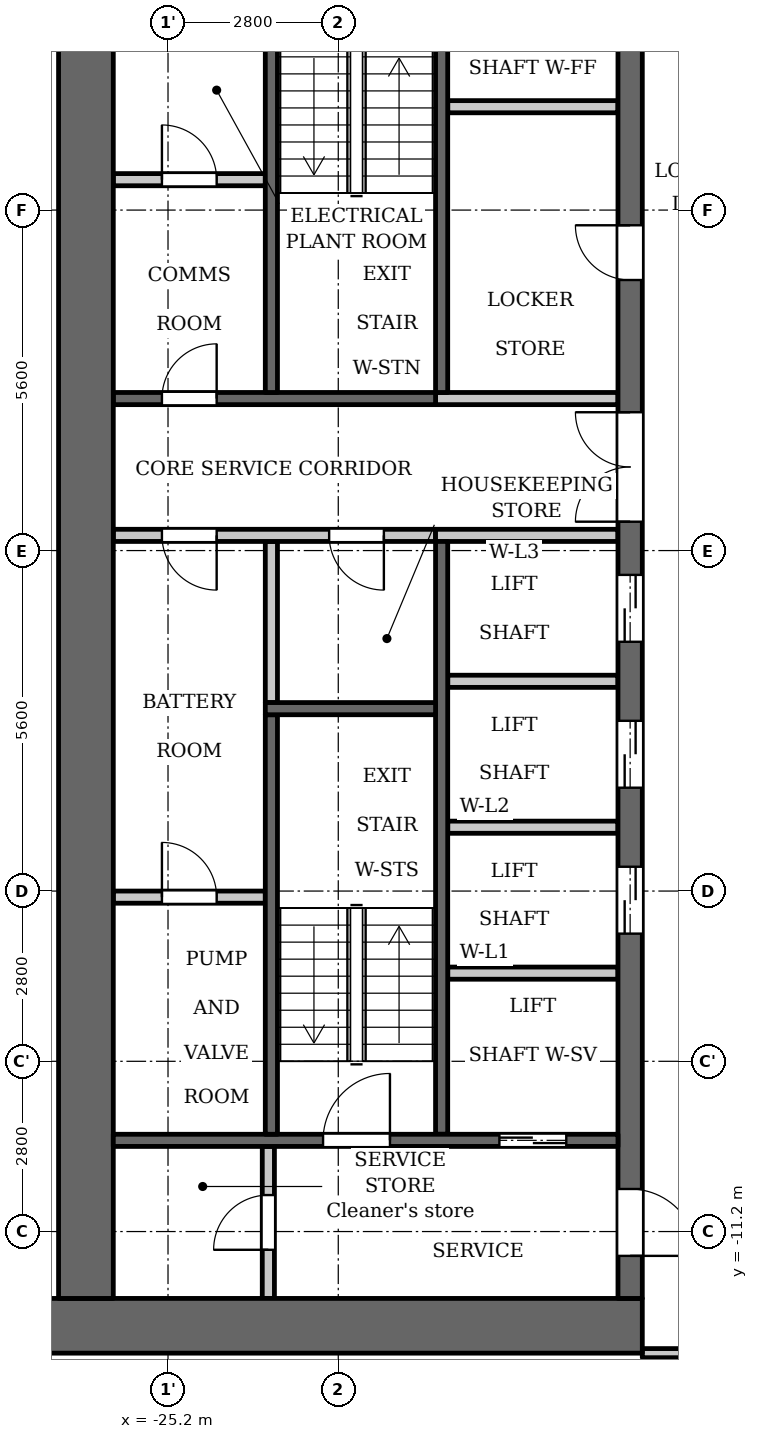
"""IFC4 building model, lengths in metres.
Left out: names, types, materials, properties, quantities, classifications, styles, units other than length and angle.
Written with IfcOpenShell. Run it as: python <this file> out.ifc"""

import sys

from ifc_helpers import new_model, si_unit, direction, frame, frame_2d, origin, place, context, subcontext, project, spatial, rectangle, extrude, element, fill, save


model = new_model("IFC4")
c1 = context("Model", 3, precision=1e-05, world=origin(), true_north=direction((0.0, 1.0)))
c2 = subcontext(c1, "Body", "Model", "MODEL_VIEW")
j1 = project(units=[si_unit("LENGTHUNIT", "METRE"), si_unit("PLANEANGLEUNIT", "RADIAN")], contexts=[c1])
p1 = place(None, origin())
s1 = spatial("IfcSite", under=j1, at=p1, CompositionType="ELEMENT")
p2 = place(p1, origin())
s2 = spatial("IfcBuilding", under=s1, at=p2, CompositionType="ELEMENT")
p3 = place(p2, frame((0.0, 0.0, 58.5)))
s3 = spatial("IfcBuildingStorey", under=s2, at=p3, CompositionType="ELEMENT", Elevation=58.5)
p4 = place(p3, frame((-23.5, -2.5, 0.0), z_axis=(0.0, 0.0, 1.0), x_axis=(0.0, 1.0, 0.0)))
e1 = element("IfcWall", 1, at=p4, inside=s3, PredefinedType="PARTITIONING", context=c2, shape_type="SweptSolid", body=[
    extrude(rectangle(XDim=2.65, YDim=0.2, at=frame_2d((1.325, 0.0))), origin(), (0.0, 0.0, 1.0), 3.2),
])
p5 = place(p3, frame((-20.7, 2.6, 0.0), z_axis=(0.0, 0.0, 1.0), x_axis=(0.0, 1.0, 0.0)))
e2 = element("IfcWall", 2, at=p5, inside=s3, PredefinedType="SHEAR", context=c2, shape_type="SweptSolid", body=[
    extrude(rectangle(XDim=7.0, YDim=0.2, at=frame_2d((3.5, 0.0))), origin(), (0.0, 0.0, 1.0), 3.2),
])
p6 = place(p3, frame((-20.7, -9.6, 0.0), z_axis=(0.0, 0.0, 1.0), x_axis=(0.0, 1.0, 0.0)))
e3 = element("IfcWall", 3, at=p6, inside=s3, PredefinedType="SHEAR", context=c2, shape_type="SweptSolid", body=[
    extrude(rectangle(XDim=9.75, YDim=0.2, at=frame_2d((4.875, 0.0))), origin(), (0.0, 0.0, 1.0), 3.2),
])
p7 = place(p3, frame((-20.8, 2.5, 0.0), z_axis=(0.0, 0.0, 1.0), x_axis=(-1.0, 0.0, 0.0)))
e4 = element("IfcWall", 4, at=p7, inside=s3, PredefinedType="SHEAR", context=c2, shape_type="SweptSolid", body=[
    extrude(rectangle(XDim=5.3, YDim=0.2, at=frame_2d((2.65, 0.0))), origin(), (0.0, 0.0, 1.0), 3.2),
])
p8 = place(p7, frame((3.6, 0.0, 0.0)))
e5 = element("IfcOpeningElement", 5, at=p8, cuts=e4, PredefinedType="OPENING", context=c2, shape_type="SweptSolid", body=[
    extrude(rectangle(XDim=0.9, YDim=2.1, at=frame_2d((0.45, 1.05))), frame((0.0, 0.11, 0.0), z_axis=(0.0, -1.0, 0.0), x_axis=(1.0, 0.0, 0.0)), (0.0, 0.0, 1.0), 0.22),
])
p9 = place(p3, frame((-20.8, 0.25, 0.0), z_axis=(0.0, 0.0, 1.0), x_axis=(-1.0, 0.0, 0.0)))
e6 = element("IfcWall", 6, at=p9, inside=s3, PredefinedType="PARTITIONING", context=c2, shape_type="SweptSolid", body=[
    extrude(rectangle(XDim=5.3, YDim=0.2, at=frame_2d((2.65, 0.0))), origin(), (0.0, 0.0, 1.0), 3.2),
])
p10 = place(p9, frame((0.85, 0.0, 0.0)))
e7 = element("IfcOpeningElement", 7, at=p10, cuts=e6, PredefinedType="OPENING", context=c2, shape_type="SweptSolid", body=[
    extrude(rectangle(XDim=0.9, YDim=2.1, at=frame_2d((0.45, 1.05))), frame((0.0, 0.11, 0.0), z_axis=(0.0, -1.0, 0.0), x_axis=(1.0, 0.0, 0.0)), (0.0, 0.0, 1.0), 0.22),
])
p11 = place(p9, frame((3.6, 0.0, 0.0)))
e8 = element("IfcOpeningElement", 8, at=p11, cuts=e6, PredefinedType="OPENING", context=c2, shape_type="SweptSolid", body=[
    extrude(rectangle(XDim=0.9, YDim=2.1, at=frame_2d((0.45, 1.05))), frame((0.0, 0.11, 0.0), z_axis=(0.0, -1.0, 0.0), x_axis=(1.0, 0.0, 0.0)), (0.0, 0.0, 1.0), 0.22),
])
p12 = place(p3, frame((-17.4, -12.75, 0.0), z_axis=(0.0, 0.0, 1.0), x_axis=(-1.0, 0.0, 0.0)))
e9 = element("IfcWall", 9, at=p12, inside=s3, PredefinedType="SHEAR", context=c2, shape_type="SweptSolid", body=[
    extrude(rectangle(XDim=10.4, YDim=0.9, at=frame_2d((5.2, 0.0))), origin(), (0.0, 0.0, 1.0), 3.2),
])
p13 = place(p3, frame((-17.6, -12.3, 0.0), z_axis=(0.0, 0.0, 1.0), x_axis=(0.0, 1.0, 0.0)))
e10 = element("IfcWall", 10, at=p13, inside=s3, PredefinedType="SHEAR", context=c2, shape_type="SweptSolid", body=[
    extrude(rectangle(XDim=24.6, YDim=0.4, at=frame_2d((12.3, 0.0))), origin(), (0.0, 0.0, 1.0), 3.2),
])
p14 = place(p13, frame((6.0, 0.0, 0.0)))
e11 = element("IfcOpeningElement", 11, at=p14, cuts=e10, PredefinedType="OPENING", context=c2, shape_type="SweptSolid", body=[
    extrude(rectangle(XDim=1.1, YDim=2.1, at=frame_2d((0.55, 1.05))), frame((0.0, 0.21, 0.0), z_axis=(0.0, -1.0, 0.0), x_axis=(1.0, 0.0, 0.0)), (0.0, 0.0, 1.0), 0.42),
])
p15 = place(p13, frame((8.4, 0.0, 0.0)))
e12 = element("IfcOpeningElement", 12, at=p15, cuts=e10, PredefinedType="OPENING", context=c2, shape_type="SweptSolid", body=[
    extrude(rectangle(XDim=1.1, YDim=2.1, at=frame_2d((0.55, 1.05))), frame((0.0, 0.21, 0.0), z_axis=(0.0, -1.0, 0.0), x_axis=(1.0, 0.0, 0.0)), (0.0, 0.0, 1.0), 0.42),
])
p16 = place(p13, frame((10.8, 0.0, 0.0)))
e13 = element("IfcOpeningElement", 13, at=p16, cuts=e10, PredefinedType="OPENING", context=c2, shape_type="SweptSolid", body=[
    extrude(rectangle(XDim=1.1, YDim=2.1, at=frame_2d((0.55, 1.05))), frame((0.0, 0.21, 0.0), z_axis=(0.0, -1.0, 0.0), x_axis=(1.0, 0.0, 0.0)), (0.0, 0.0, 1.0), 0.42),
])
p17 = place(p13, frame((16.75, 0.0, 0.0)))
e14 = element("IfcOpeningElement", 14, at=p17, cuts=e10, PredefinedType="OPENING", context=c2, shape_type="SweptSolid", body=[
    extrude(rectangle(XDim=0.9, YDim=2.1, at=frame_2d((0.45, 1.05))), frame((0.0, 0.21, 0.0), z_axis=(0.0, -1.0, 0.0), x_axis=(1.0, 0.0, 0.0)), (0.0, 0.0, 1.0), 0.42),
])
p18 = place(p13, frame((22.8, 0.0, 0.0)))
e15 = element("IfcOpeningElement", 15, at=p18, cuts=e10, PredefinedType="OPENING", context=c2, shape_type="SweptSolid", body=[
    extrude(rectangle(XDim=1.1, YDim=2.1, at=frame_2d((0.55, 1.05))), frame((0.0, 0.21, 0.0), z_axis=(0.0, -1.0, 0.0), x_axis=(1.0, 0.0, 0.0)), (0.0, 0.0, 1.0), 0.42),
])
p19 = place(p13, frame((0.7, 0.0, 0.0)))
e16 = element("IfcOpeningElement", 16, at=p19, cuts=e10, PredefinedType="OPENING", context=c2, shape_type="SweptSolid", body=[
    extrude(rectangle(XDim=1.1, YDim=2.1, at=frame_2d((0.55, 1.05))), frame((0.0, 0.21, 0.0), z_axis=(0.0, -1.0, 0.0), x_axis=(1.0, 0.0, 0.0)), (0.0, 0.0, 1.0), 0.42),
])
p20 = place(p13, frame((12.775, 0.0, 0.0)))
e17 = element("IfcOpeningElement", 17, at=p20, cuts=e10, PredefinedType="OPENING", context=c2, shape_type="SweptSolid", body=[
    extrude(rectangle(XDim=1.8, YDim=2.1, at=frame_2d((0.9, 1.05))), frame((0.0, 0.21, 0.0), z_axis=(0.0, -1.0, 0.0), x_axis=(1.0, 0.0, 0.0)), (0.0, 0.0, 1.0), 0.42),
])
p21 = place(p3, frame((-26.55, -12.3, 0.0), z_axis=(0.0, 0.0, 1.0), x_axis=(0.0, 1.0, 0.0)))
e18 = element("IfcWall", 18, at=p21, inside=s3, PredefinedType="SHEAR", context=c2, shape_type="SweptSolid", body=[
    extrude(rectangle(XDim=24.6, YDim=0.9, at=frame_2d((12.3, 0.0))), origin(), (0.0, 0.0, 1.0), 3.2),
])
p22 = place(p3, frame((-23.55, -12.3, 0.0), z_axis=(0.0, 0.0, 1.0), x_axis=(0.0, 1.0, 0.0)))
e19 = element("IfcWall", 19, at=p22, inside=s3, PredefinedType="PARTITIONING", context=c2, shape_type="SweptSolid", body=[
    extrude(rectangle(XDim=2.5, YDim=0.2, at=frame_2d((1.25, 0.0))), origin(), (0.0, 0.0, 1.0), 3.2),
])
p23 = place(p22, frame((0.8, 0.0, 0.0)))
e20 = element("IfcOpeningElement", 20, at=p23, cuts=e19, PredefinedType="OPENING", context=c2, shape_type="SweptSolid", body=[
    extrude(rectangle(XDim=0.9, YDim=2.1, at=frame_2d((0.45, 1.05))), frame((0.0, 0.11, 0.0), z_axis=(0.0, -1.0, 0.0), x_axis=(1.0, 0.0, 0.0)), (0.0, 0.0, 1.0), 0.22),
])
p24 = place(p3, frame((-23.6, -5.7, 0.0), z_axis=(0.0, 0.0, 1.0), x_axis=(-1.0, 0.0, 0.0)))
e21 = element("IfcWall", 21, at=p24, inside=s3, PredefinedType="PARTITIONING", context=c2, shape_type="SweptSolid", body=[
    extrude(rectangle(XDim=2.5, YDim=0.2, at=frame_2d((1.25, 0.0))), origin(), (0.0, 0.0, 1.0), 3.2),
])
p25 = place(p24, frame((0.8, 0.0, 0.0)))
e22 = element("IfcOpeningElement", 22, at=p25, cuts=e21, PredefinedType="OPENING", context=c2, shape_type="SweptSolid", body=[
    extrude(rectangle(XDim=0.9, YDim=2.1, at=frame_2d((0.45, 1.05))), frame((0.0, 0.11, 0.0), z_axis=(0.0, -1.0, 0.0), x_axis=(1.0, 0.0, 0.0)), (0.0, 0.0, 1.0), 0.22),
])
p26 = place(p3, frame((-23.6, 6.1, 0.0), z_axis=(0.0, 0.0, 1.0), x_axis=(-1.0, 0.0, 0.0)))
e23 = element("IfcWall", 23, at=p26, inside=s3, PredefinedType="PARTITIONING", context=c2, shape_type="SweptSolid", body=[
    extrude(rectangle(XDim=2.5, YDim=0.2, at=frame_2d((1.25, 0.0))), origin(), (0.0, 0.0, 1.0), 3.2),
])
p27 = place(p26, frame((0.8, 0.0, 0.0)))
e24 = element("IfcOpeningElement", 24, at=p27, cuts=e23, PredefinedType="OPENING", context=c2, shape_type="SweptSolid", body=[
    extrude(rectangle(XDim=0.9, YDim=2.1, at=frame_2d((0.45, 1.05))), frame((0.0, 0.11, 0.0), z_axis=(0.0, -1.0, 0.0), x_axis=(1.0, 0.0, 0.0)), (0.0, 0.0, 1.0), 0.22),
])
p28 = place(p3, frame((-17.8, -9.7, 0.0), z_axis=(0.0, 0.0, 1.0), x_axis=(-1.0, 0.0, 0.0)))
e25 = element("IfcWall", 25, at=p28, inside=s3, PredefinedType="SHEAR", context=c2, shape_type="SweptSolid", body=[
    extrude(rectangle(XDim=8.3, YDim=0.2, at=frame_2d((4.15, 0.0))), origin(), (0.0, 0.0, 1.0), 3.2),
])
p29 = place(p28, frame((0.85, 0.0, 0.0)))
e26 = element("IfcOpeningElement", 26, at=p29, cuts=e25, PredefinedType="OPENING", context=c2, shape_type="SweptSolid", body=[
    extrude(rectangle(XDim=1.1, YDim=2.1, at=frame_2d((0.55, 1.05))), frame((0.0, 0.11, 0.0), z_axis=(0.0, -1.0, 0.0), x_axis=(1.0, 0.0, 0.0)), (0.0, 0.0, 1.0), 0.22),
])
p30 = place(p28, frame((3.75, 0.0, 0.0)))
e27 = element("IfcOpeningElement", 27, at=p30, cuts=e25, PredefinedType="OPENING", context=c2, shape_type="SweptSolid", body=[
    extrude(rectangle(XDim=1.1, YDim=2.1, at=frame_2d((0.55, 1.05))), frame((0.0, 0.11, 0.0), z_axis=(0.0, -1.0, 0.0), x_axis=(1.0, 0.0, 0.0)), (0.0, 0.0, 1.0), 0.22),
])
for number, where, z_axis, x_axis in (
    (28, (-17.8, -6.95, 0.0), (0.0, 0.0, 1.0), (-1.0, 0.0, 0.0)),
    (29, (-17.8, -4.55, 0.0), (0.0, 0.0, 1.0), (-1.0, 0.0, 0.0)),
    (30, (-17.8, -2.15, 0.0), (0.0, 0.0, 1.0), (-1.0, 0.0, 0.0)),
):
    element("IfcWall", number, at=place(p3, frame(where, z_axis=z_axis, x_axis=x_axis)), inside=s3, PredefinedType="PARTITIONING", context=c2, shape_type="SweptSolid", body=[
        extrude(rectangle(XDim=2.8, YDim=0.2, at=frame_2d((1.4, 0.0))), origin(), (0.0, 0.0, 1.0), 3.2),
    ])
for number, where, z_axis, x_axis in (
    (31, (-17.8, 0.25, 0.0), (0.0, 0.0, 1.0), (-1.0, 0.0, 0.0)),
    (32, (-17.8, 2.5, 0.0), (0.0, 0.0, 1.0), (-1.0, 0.0, 0.0)),
):
    element("IfcWall", number, at=place(p3, frame(where, z_axis=z_axis, x_axis=x_axis)), inside=s3, PredefinedType="PARTITIONING", context=c2, shape_type="SweptSolid", body=[
        extrude(rectangle(XDim=3.0, YDim=0.2, at=frame_2d((1.5, 0.0))), origin(), (0.0, 0.0, 1.0), 3.2),
    ])
p31 = place(p3, frame((-17.8, 7.3, 0.0), z_axis=(0.0, 0.0, 1.0), x_axis=(-1.0, 0.0, 0.0)))
e33 = element("IfcWall", 33, at=p31, inside=s3, PredefinedType="PARTITIONING", context=c2, shape_type="SweptSolid", body=[
    extrude(rectangle(XDim=2.8, YDim=0.2, at=frame_2d((1.4, 0.0))), origin(), (0.0, 0.0, 1.0), 3.2),
])
p32 = place(p3, frame((-23.5, 2.6, 0.0), z_axis=(0.0, 0.0, 1.0), x_axis=(0.0, 1.0, 0.0)))
e34 = element("IfcWall", 34, at=p32, inside=s3, PredefinedType="SHEAR", context=c2, shape_type="SweptSolid", body=[
    extrude(rectangle(XDim=7.0, YDim=0.2, at=frame_2d((3.5, 0.0))), origin(), (0.0, 0.0, 1.0), 3.2),
])
p33 = place(p3, frame((-23.5, -9.6, 0.0), z_axis=(0.0, 0.0, 1.0), x_axis=(0.0, 1.0, 0.0)))
e35 = element("IfcWall", 35, at=p33, inside=s3, PredefinedType="SHEAR", context=c2, shape_type="SweptSolid", body=[
    extrude(rectangle(XDim=6.9, YDim=0.2, at=frame_2d((3.45, 0.0))), origin(), (0.0, 0.0, 1.0), 3.2),
])
p34 = place(p3, frame((-20.8, -2.6, 0.0), z_axis=(0.0, 0.0, 1.0), x_axis=(-1.0, 0.0, 0.0)))
e36 = element("IfcWall", 36, at=p34, inside=s3, PredefinedType="SHEAR", context=c2, shape_type="SweptSolid", body=[
    extrude(rectangle(XDim=2.8, YDim=0.2, at=frame_2d((1.4, 0.0))), origin(), (0.0, 0.0, 1.0), 3.2),
])
p35 = place(p3, frame((-17.4, -13.2, 0.0), z_axis=(0.0, 0.0, 1.0), x_axis=(1.0, 0.0, 0.0)))
e37 = element("IfcWall", 37, at=p35, inside=s3, PredefinedType="PARTITIONING", context=c2, shape_type="SweptSolid", body=[
    extrude(rectangle(XDim=34.8, YDim=0.15, at=frame_2d((17.4, 0.0))), origin(), (0.0, 0.0, 1.0), 3.2),
])
p36 = place(p35, frame((0.65, 0.0, 0.0)))
e38 = element("IfcOpeningElement", 38, at=p36, cuts=e37, PredefinedType="OPENING", context=c2, shape_type="SweptSolid", body=[
    extrude(rectangle(XDim=1.0, YDim=2.1, at=frame_2d((0.5, 1.05))), frame((0.0, 0.085, 0.0), z_axis=(0.0, -1.0, 0.0), x_axis=(1.0, 0.0, 0.0)), (0.0, 0.0, 1.0), 0.17),
])
p37 = place(p35, frame((33.05, 0.0, 0.0)))
e39 = element("IfcOpeningElement", 39, at=p37, cuts=e37, PredefinedType="OPENING", context=c2, shape_type="SweptSolid", body=[
    extrude(rectangle(XDim=1.0, YDim=2.1, at=frame_2d((0.5, 1.05))), frame((0.0, 0.085, 0.0), z_axis=(0.0, -1.0, 0.0), x_axis=(1.0, 0.0, 0.0)), (0.0, 0.0, 1.0), 0.17),
])
p38 = place(p35, frame((10.15, 0.0, 0.0)))
e40 = element("IfcOpeningElement", 40, at=p38, cuts=e37, PredefinedType="OPENING", context=c2, shape_type="SweptSolid", body=[
    extrude(rectangle(XDim=1.0, YDim=2.1, at=frame_2d((0.5, 1.05))), frame((0.0, 0.085, 0.0), z_axis=(0.0, -1.0, 0.0), x_axis=(1.0, 0.0, 0.0)), (0.0, 0.0, 1.0), 0.17),
])
p39 = place(p35, frame((21.35, 0.0, 0.0)))
e41 = element("IfcOpeningElement", 41, at=p39, cuts=e37, PredefinedType="OPENING", context=c2, shape_type="SweptSolid", body=[
    extrude(rectangle(XDim=1.0, YDim=2.1, at=frame_2d((0.5, 1.05))), frame((0.0, 0.085, 0.0), z_axis=(0.0, -1.0, 0.0), x_axis=(1.0, 0.0, 0.0)), (0.0, 0.0, 1.0), 0.17),
])
p40 = place(p35, frame((30.75, 0.0, 0.0)))
e42 = element("IfcOpeningElement", 42, at=p40, cuts=e37, PredefinedType="OPENING", context=c2, shape_type="SweptSolid", body=[
    extrude(rectangle(XDim=1.0, YDim=2.1, at=frame_2d((0.5, 1.05))), frame((0.0, 0.085, 0.0), z_axis=(0.0, -1.0, 0.0), x_axis=(1.0, 0.0, 0.0)), (0.0, 0.0, 1.0), 0.17),
])
p41 = place(p29, origin())
e43 = element("IfcDoor", 43, at=p41, inside=s3, OperationType="DOUBLE_DOOR_SLIDING", PredefinedType="DOOR", context=c2, shape_type="SweptSolid", body=[
    extrude(rectangle(XDim=1.1, YDim=2.1, at=frame_2d((0.55, 1.05))), frame((0.0, 0.025, 0.0), z_axis=(0.0, -1.0, 0.0), x_axis=(1.0, 0.0, 0.0)), (0.0, 0.0, 1.0), 0.05),
])
fill(e26, e43)
p42 = place(p14, origin())
e44 = element("IfcDoor", 44, at=p42, inside=s3, OperationType="DOUBLE_DOOR_SLIDING", PredefinedType="DOOR", context=c2, shape_type="SweptSolid", body=[
    extrude(rectangle(XDim=1.1, YDim=2.1, at=frame_2d((0.55, 1.05))), frame((0.0, 0.025, 0.0), z_axis=(0.0, -1.0, 0.0), x_axis=(1.0, 0.0, 0.0)), (0.0, 0.0, 1.0), 0.05),
])
fill(e11, e44)
p43 = place(p15, origin())
e45 = element("IfcDoor", 45, at=p43, inside=s3, OperationType="DOUBLE_DOOR_SLIDING", PredefinedType="DOOR", context=c2, shape_type="SweptSolid", body=[
    extrude(rectangle(XDim=1.1, YDim=2.1, at=frame_2d((0.55, 1.05))), frame((0.0, 0.025, 0.0), z_axis=(0.0, -1.0, 0.0), x_axis=(1.0, 0.0, 0.0)), (0.0, 0.0, 1.0), 0.05),
])
fill(e12, e45)
p44 = place(p16, origin())
e46 = element("IfcDoor", 46, at=p44, inside=s3, OperationType="DOUBLE_DOOR_SLIDING", PredefinedType="DOOR", context=c2, shape_type="SweptSolid", body=[
    extrude(rectangle(XDim=1.1, YDim=2.1, at=frame_2d((0.55, 1.05))), frame((0.0, 0.025, 0.0), z_axis=(0.0, -1.0, 0.0), x_axis=(1.0, 0.0, 0.0)), (0.0, 0.0, 1.0), 0.05),
])
fill(e13, e46)
p45 = place(p17, origin())
e47 = element("IfcDoor", 47, at=p45, inside=s3, OperationType="SINGLE_SWING_LEFT", PredefinedType="DOOR", context=c2, shape_type="SweptSolid", body=[
    extrude(rectangle(XDim=0.9, YDim=2.1, at=frame_2d((0.45, 1.05))), frame((0.0, 0.025, 0.0), z_axis=(0.0, -1.0, 0.0), x_axis=(1.0, 0.0, 0.0)), (0.0, 0.0, 1.0), 0.05),
])
fill(e14, e47)
p46 = place(p19, origin())
e48 = element("IfcDoor", 48, at=p46, inside=s3, OperationType="SINGLE_SWING_LEFT", PredefinedType="DOOR", context=c2, shape_type="SweptSolid", body=[
    extrude(rectangle(XDim=1.1, YDim=2.1, at=frame_2d((0.55, 1.05))), frame((0.0, 0.025, 0.0), z_axis=(0.0, -1.0, 0.0), x_axis=(1.0, 0.0, 0.0)), (0.0, 0.0, 1.0), 0.05),
])
fill(e16, e48)
p47 = place(p23, origin())
e49 = element("IfcDoor", 49, at=p47, inside=s3, OperationType="SINGLE_SWING_RIGHT", PredefinedType="DOOR", context=c2, shape_type="SweptSolid", body=[
    extrude(rectangle(XDim=0.9, YDim=2.1, at=frame_2d((0.45, 1.05))), frame((0.0, 0.025, 0.0), z_axis=(0.0, -1.0, 0.0), x_axis=(1.0, 0.0, 0.0)), (0.0, 0.0, 1.0), 0.05),
])
fill(e20, e49)
p48 = place(p30, origin())
e50 = element("IfcDoor", 50, at=p48, inside=s3, OperationType="SINGLE_SWING_LEFT", PredefinedType="DOOR", context=c2, shape_type="SweptSolid", body=[
    extrude(rectangle(XDim=1.1, YDim=2.1, at=frame_2d((0.55, 1.05))), frame((0.0, 0.025, 0.0), z_axis=(0.0, -1.0, 0.0), x_axis=(1.0, 0.0, 0.0)), (0.0, 0.0, 1.0), 0.05),
])
fill(e27, e50)
p49 = place(p20, origin())
e51 = element("IfcDoor", 51, at=p49, inside=s3, OperationType="DOUBLE_DOOR_SINGLE_SWING", PredefinedType="DOOR", context=c2, shape_type="SweptSolid", body=[
    extrude(rectangle(XDim=1.8, YDim=2.1, at=frame_2d((0.9, 1.05))), frame((0.0, 0.025, 0.0), z_axis=(0.0, -1.0, 0.0), x_axis=(1.0, 0.0, 0.0)), (0.0, 0.0, 1.0), 0.05),
])
fill(e17, e51)
p50 = place(p10, origin())
e52 = element("IfcDoor", 52, at=p50, inside=s3, OperationType="SINGLE_SWING_RIGHT", PredefinedType="DOOR", context=c2, shape_type="SweptSolid", body=[
    extrude(rectangle(XDim=0.9, YDim=2.1, at=frame_2d((0.45, 1.05))), frame((0.0, 0.025, 0.0), z_axis=(0.0, -1.0, 0.0), x_axis=(1.0, 0.0, 0.0)), (0.0, 0.0, 1.0), 0.05),
])
fill(e7, e52)
p51 = place(p25, origin())
e53 = element("IfcDoor", 53, at=p51, inside=s3, OperationType="SINGLE_SWING_RIGHT", PredefinedType="DOOR", context=c2, shape_type="SweptSolid", body=[
    extrude(rectangle(XDim=0.9, YDim=2.1, at=frame_2d((0.45, 1.05))), frame((0.0, 0.025, 0.0), z_axis=(0.0, -1.0, 0.0), x_axis=(1.0, 0.0, 0.0)), (0.0, 0.0, 1.0), 0.05),
])
fill(e22, e53)
p52 = place(p11, origin())
e54 = element("IfcDoor", 54, at=p52, inside=s3, OperationType="SINGLE_SWING_RIGHT", PredefinedType="DOOR", context=c2, shape_type="SweptSolid", body=[
    extrude(rectangle(XDim=0.9, YDim=2.1, at=frame_2d((0.45, 1.05))), frame((0.0, 0.025, 0.0), z_axis=(0.0, -1.0, 0.0), x_axis=(1.0, 0.0, 0.0)), (0.0, 0.0, 1.0), 0.05),
])
fill(e8, e54)
p53 = place(p27, origin())
e55 = element("IfcDoor", 55, at=p53, inside=s3, OperationType="SINGLE_SWING_RIGHT", PredefinedType="DOOR", context=c2, shape_type="SweptSolid", body=[
    extrude(rectangle(XDim=0.9, YDim=2.1, at=frame_2d((0.45, 1.05))), frame((0.0, 0.025, 0.0), z_axis=(0.0, -1.0, 0.0), x_axis=(1.0, 0.0, 0.0)), (0.0, 0.0, 1.0), 0.05),
])
fill(e24, e55)
p54 = place(p8, origin())
e56 = element("IfcDoor", 56, at=p54, inside=s3, OperationType="SINGLE_SWING_LEFT", PredefinedType="DOOR", context=c2, shape_type="SweptSolid", body=[
    extrude(rectangle(XDim=0.9, YDim=2.1, at=frame_2d((0.45, 1.05))), frame((0.0, 0.025, 0.0), z_axis=(0.0, -1.0, 0.0), x_axis=(1.0, 0.0, 0.0)), (0.0, 0.0, 1.0), 0.05),
])
fill(e5, e56)
save(model, sys.argv[1])
